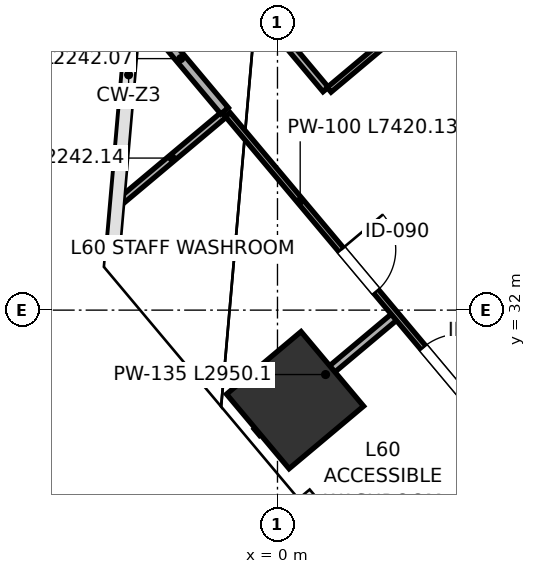
"""IFC4 building model, lengths in metres.
Left out: names, types, materials, properties, quantities, classifications, styles, units other than length and angle.
Written with IfcOpenShell. Run it as: python <this file> out.ifc"""

import sys

from ifc_helpers import new_model, si_unit, direction, frame, frame_2d, origin, origin_2d, place, context, subcontext, project, spatial, rectangle, extrude, source, transform, mapped, element, fill, save


model = new_model("IFC4")
c1 = context("Model", 3, precision=1e-05, world=origin(), true_north=direction((0.0, 1.0)))
c2 = subcontext(c1, "Body", "Model", "MODEL_VIEW")
j1 = project(units=[si_unit("LENGTHUNIT", "METRE"), si_unit("PLANEANGLEUNIT", "RADIAN")], contexts=[c1])
p1 = place(None, origin())
s1 = spatial("IfcSite", under=j1, at=p1, CompositionType="ELEMENT")
p2 = place(p1, origin())
s2 = spatial("IfcBuilding", under=s1, at=p2, CompositionType="ELEMENT")
p3 = place(p2, frame((0.0, 0.0, 266.8)))
s3 = spatial("IfcBuildingStorey", under=s2, at=p3, CompositionType="ELEMENT", Elevation=266.8)
m1 = source(origin(), c2, "Body", "SweptSolid", [
    extrude(rectangle(XDim=1.6, YDim=1.6, at=origin_2d()), origin(), (0.0, 0.0, 1.0), 4.198),
])
p4 = place(p3, frame((0.289, 30.52, 0.001), z_axis=(0.0, 0.0, 1.0), x_axis=(-0.642787609687, 0.766044443119, 0.0)))
e1 = element("IfcColumn", 1, at=p4, inside=s3, PredefinedType="COLUMN", context=c2, shape_type="MappedRepresentation", body=[
    mapped(m1, transform((0.0, 0.0, 0.0), scale=1.0)),
])
p5 = place(p3, frame((-2.593, 33.78, 0.0), z_axis=(0.0, 0.0, 1.0), x_axis=(0.765994359698, 0.642847292062, 0.0)))
e2 = element("IfcWall", 2, at=p5, inside=s3, PredefinedType="PARTITIONING", context=c2, shape_type="SweptSolid", body=[
    extrude(rectangle(XDim=2.242, YDim=0.115, at=frame_2d((1.121, 0.0))), origin(), (0.0, 0.0, 1.0), 3.96),
])
p6 = place(p3, frame((-2.312, 36.995, 0.0), z_axis=(0.0, 0.0, 1.0), x_axis=(0.642783398336, -0.766047976842, 0.0)))
e3 = element("IfcWall", 3, at=p6, inside=s3, PredefinedType="PARTITIONING", context=c2, shape_type="SweptSolid", body=[
    extrude(rectangle(XDim=2.242, YDim=0.16, at=frame_2d((1.121, 0.0))), origin(), (0.0, 0.0, 1.0), 3.96),
])
p7 = place(p3, frame((-0.339, 29.992, 0.0), z_axis=(0.0, 0.0, 1.0), x_axis=(0.766025914603, 0.642809690465, 0.0)))
e4 = element("IfcWall", 4, at=p7, inside=s3, PredefinedType="PARTITIONING", context=c2, shape_type="SweptSolid", body=[
    extrude(rectangle(XDim=2.95, YDim=0.135, at=frame_2d((1.475, 0.0))), origin(), (0.0, 0.0, 1.0), 3.195),
])
p8 = place(p3, frame((1.686, 27.58, 0.0), z_axis=(0.0, 0.0, 1.0), x_axis=(0.766107411761, 0.642712559116, 0.0)))
e5 = element("IfcWall", 5, at=p8, inside=s3, PredefinedType="PARTITIONING", context=c2, shape_type="SweptSolid", body=[
    extrude(rectangle(XDim=2.95, YDim=0.115, at=frame_2d((1.475, 0.0))), origin(), (0.0, 0.0, 1.0), 3.195),
])
p9 = place(p3, frame((-0.819, 35.216, 0.0), z_axis=(0.0, 0.0, 1.0), x_axis=(0.642772999209, -0.766056702528, 0.0)))
e6 = element("IfcWall", 6, at=p9, inside=s3, PredefinedType="PARTITIONING", context=c2, shape_type="SweptSolid", body=[
    extrude(rectangle(XDim=7.42, YDim=0.1, at=frame_2d((3.71, 0.0))), origin(), (0.0, 0.0, 1.0), 3.96),
])
p10 = place(p9, frame((2.9, 0.0, 0.0)))
e7 = element("IfcOpeningElement", 7, at=p10, cuts=e6, PredefinedType="OPENING", context=c2, shape_type="SweptSolid", body=[
    extrude(rectangle(XDim=0.9, YDim=2.15, at=frame_2d((0.45, 1.075))), frame((0.0, 0.06, 0.0), z_axis=(0.0, -1.0, 0.0), x_axis=(1.0, 0.0, 0.0)), (0.0, 0.0, 1.0), 0.12),
])
p11 = place(p9, frame((5.0, 0.0, 0.0)))
e8 = element("IfcOpeningElement", 8, at=p11, cuts=e6, PredefinedType="OPENING", context=c2, shape_type="SweptSolid", body=[
    extrude(rectangle(XDim=0.95, YDim=2.15, at=frame_2d((0.475, 1.075))), frame((0.0, 0.06, 0.0), z_axis=(0.0, -1.0, 0.0), x_axis=(1.0, 0.0, 0.0)), (0.0, 0.0, 1.0), 0.12),
])
p12 = place(p3, frame((-2.055, 39.022, 0.0), z_axis=(0.0, 0.0, 1.0), x_axis=(0.642777132802, -0.766053234147, 0.0)))
e9 = element("IfcWall", 9, at=p12, inside=s3, PredefinedType="PARTITIONING", context=c2, shape_type="SweptSolid", body=[
    extrude(rectangle(XDim=4.43, YDim=0.115, at=frame_2d((2.215, 0.0))), origin(), (0.0, 0.0, 1.0), 3.96),
])
p13 = place(p3, frame((0.849, 35.624, 0.0), z_axis=(0.0, 0.0, 1.0), x_axis=(0.766042777978, 0.642789594119, 0.0)))
e10 = element("IfcWall", 10, at=p13, inside=s3, PredefinedType="PARTITIONING", context=c2, shape_type="SweptSolid", body=[
    extrude(rectangle(XDim=29.51, YDim=0.1, at=frame_2d((14.755, 0.0))), origin(), (0.0, 0.0, 1.0), 3.96),
])
p14 = place(p13, frame((2.6, 0.0, 0.0)))
e11 = element("IfcOpeningElement", 11, at=p14, cuts=e10, PredefinedType="OPENING", context=c2, shape_type="SweptSolid", body=[
    extrude(rectangle(XDim=0.95, YDim=2.15, at=frame_2d((0.475, 1.075))), frame((0.0, 0.06, 0.0), z_axis=(0.0, -1.0, 0.0), x_axis=(1.0, 0.0, 0.0)), (0.0, 0.0, 1.0), 0.12),
])
m2 = source(origin(), c2, "Body", "SweptSolid", [
    extrude(rectangle(XDim=0.9, YDim=2.15, at=frame_2d((0.45, 1.075))), frame((0.0, 0.025, 0.0), z_axis=(0.0, -1.0, 0.0), x_axis=(1.0, 0.0, 0.0)), (0.0, 0.0, 1.0), 0.05),
])
p15 = place(p10, origin())
e12 = element("IfcDoor", 12, at=p15, inside=s3, OperationType="SINGLE_SWING_LEFT", PredefinedType="DOOR", context=c2, shape_type="MappedRepresentation", body=[
    mapped(m2, transform((0.0, 0.0, 0.0), scale=1.0)),
])
fill(e7, e12)
m3 = source(origin(), c2, "Body", "SweptSolid", [
    extrude(rectangle(XDim=0.95, YDim=2.15, at=frame_2d((0.475, 1.075))), frame((0.0, 0.025, 0.0), z_axis=(0.0, -1.0, 0.0), x_axis=(1.0, 0.0, 0.0)), (0.0, 0.0, 1.0), 0.05),
])
p16 = place(p11, origin())
e13 = element("IfcDoor", 13, at=p16, inside=s3, OperationType="SINGLE_SWING_RIGHT", PredefinedType="DOOR", context=c2, shape_type="MappedRepresentation", body=[
    mapped(m3, transform((0.0, 0.0, 0.0), scale=1.0)),
])
fill(e8, e13)
save(model, sys.argv[1])
